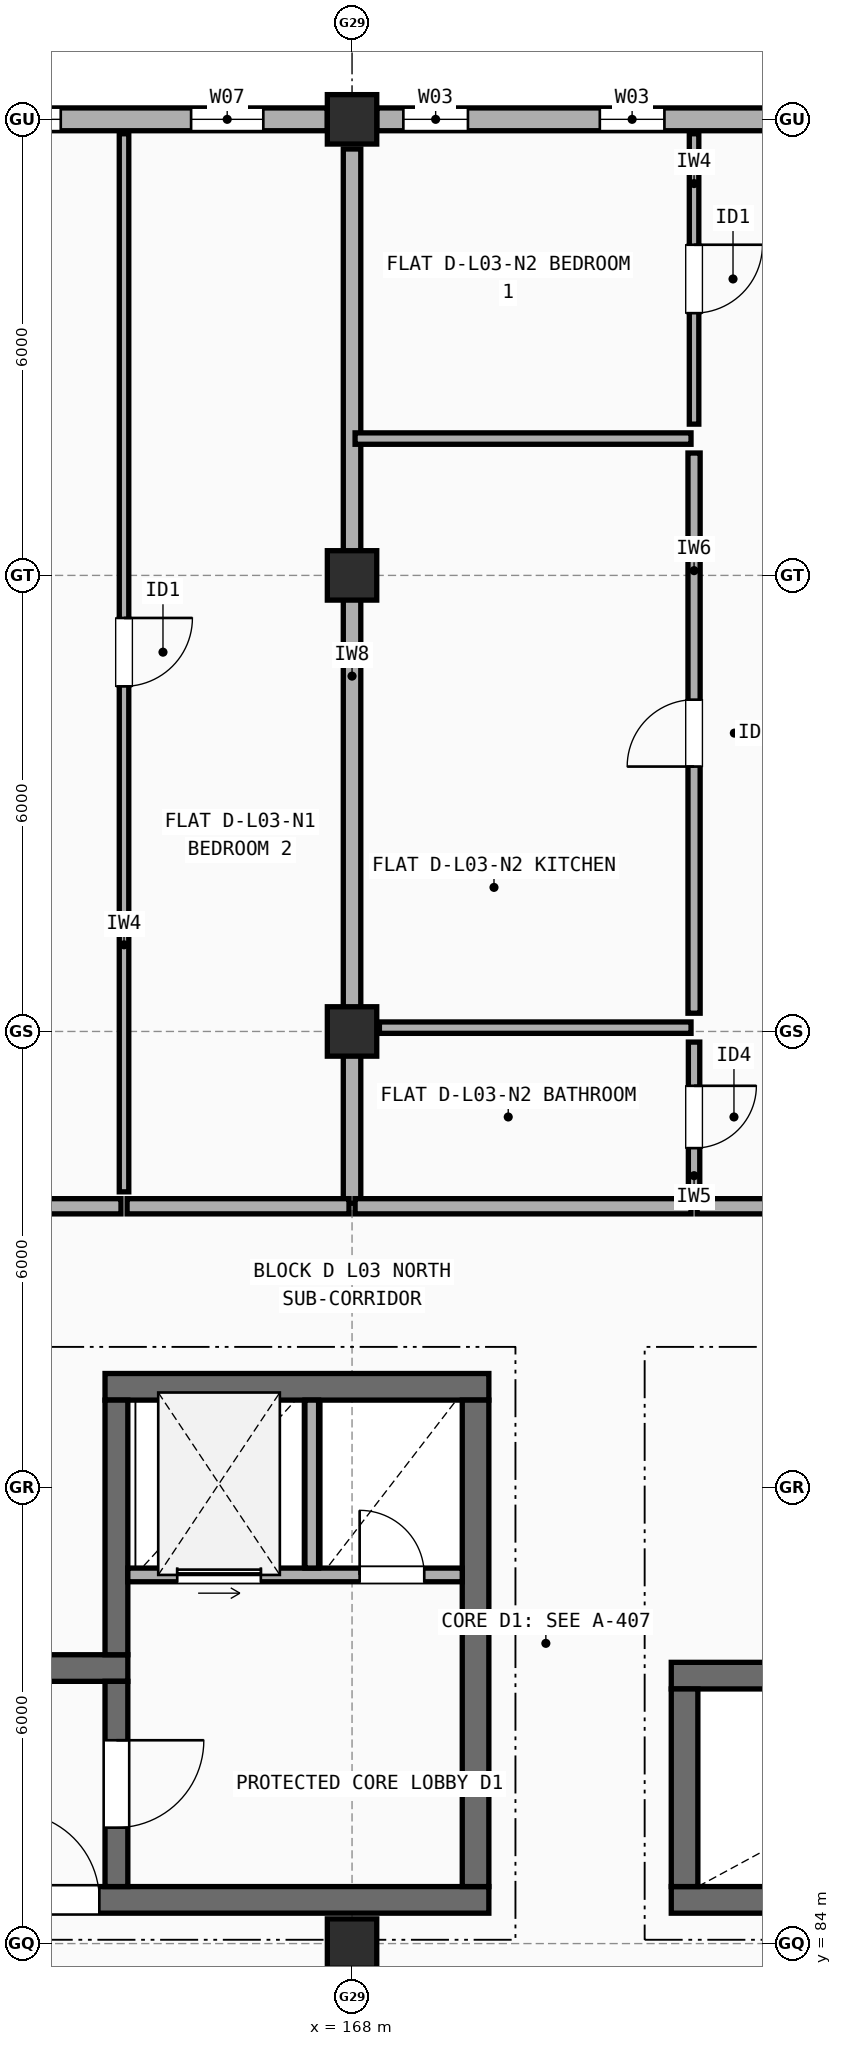
"""IFC4 building model, lengths in metres.
Left out: names, types, materials, properties, quantities, classifications, styles, units other than length and angle.
Written with IfcOpenShell. Run it as: python <this file> out.ifc"""

import sys

from ifc_helpers import new_model, si_unit, direction, frame, frame_2d, origin, origin_2d, place, context, subcontext, project, spatial, rectangle, extrude, element, fill, save


model = new_model("IFC4")
c1 = context("Model", 3, precision=1e-05, world=origin(), true_north=direction((0.0, 1.0)))
c2 = subcontext(c1, "Body", "Model", "MODEL_VIEW")
j1 = project(units=[si_unit("LENGTHUNIT", "METRE"), si_unit("PLANEANGLEUNIT", "RADIAN")], contexts=[c1])
p1 = place(None, origin())
s1 = spatial("IfcSite", under=j1, at=p1, CompositionType="ELEMENT")
p2 = place(p1, origin())
s2 = spatial("IfcBuilding", under=s1, at=p2, CompositionType="ELEMENT")
p3 = place(p2, frame((0.0, 0.0, 10.9)))
s3 = spatial("IfcBuildingStorey", under=s2, at=p3, CompositionType="ELEMENT", Elevation=10.9)
for number, where, z_axis, x_axis in (
    (1, (168.0, 84.0, 0.0), (0.0, 0.0, 1.0), (1.0, 0.0, 0.0)),
    (2, (168.0, 96.0, 0.0), (0.0, 0.0, 1.0), (1.0, 0.0, 0.0)),
    (3, (168.0, 102.0, 0.0), (0.0, 0.0, 1.0), (1.0, 0.0, 0.0)),
    (4, (168.0, 108.0, 0.0), (0.0, 0.0, 1.0), (1.0, 0.0, 0.0)),
):
    element("IfcColumn", number, at=place(p3, frame(where, z_axis=z_axis, x_axis=x_axis)), inside=s3, PredefinedType="COLUMN", context=c2, shape_type="SweptSolid", body=[
        extrude(rectangle(XDim=0.65, YDim=0.65, at=origin_2d()), origin(), (0.0, 0.0, 1.0), 2.96),
    ])
p4 = place(p3, frame((173.675, 108.0, 0.0), z_axis=(0.0, 0.0, 1.0), x_axis=(-1.0, 0.0, 0.0)))
e5 = element("IfcWall", 5, at=p4, inside=s3, PredefinedType="STANDARD", context=c2, shape_type="SweptSolid", body=[
    extrude(rectangle(XDim=5.35, YDim=0.3, at=frame_2d((2.675, 0.0))), origin(), (0.0, 0.0, 1.0), 2.442),
])
p5 = place(p4, frame((1.565, 0.0, 0.9)))
e6 = element("IfcOpeningElement", 6, at=p5, cuts=e5, PredefinedType="OPENING", context=c2, shape_type="SweptSolid", body=[
    extrude(rectangle(XDim=0.85, YDim=1.25, at=frame_2d((0.425, 0.625))), frame((0.0, 0.16, 0.0), z_axis=(0.0, -1.0, 0.0), x_axis=(1.0, 0.0, 0.0)), (0.0, 0.0, 1.0), 0.32),
])
p6 = place(p4, frame((4.15, 0.0, 0.9)))
e7 = element("IfcOpeningElement", 7, at=p6, cuts=e5, PredefinedType="OPENING", context=c2, shape_type="SweptSolid", body=[
    extrude(rectangle(XDim=0.85, YDim=1.25, at=frame_2d((0.425, 0.625))), frame((0.0, 0.16, 0.0), z_axis=(0.0, -1.0, 0.0), x_axis=(1.0, 0.0, 0.0)), (0.0, 0.0, 1.0), 0.32),
])
p7 = place(p3, frame((167.675, 108.0, 0.0), z_axis=(0.0, 0.0, 1.0), x_axis=(-1.0, 0.0, 0.0)))
e8 = element("IfcWall", 8, at=p7, inside=s3, PredefinedType="STANDARD", context=c2, shape_type="SweptSolid", body=[
    extrude(rectangle(XDim=5.35, YDim=0.3, at=frame_2d((2.675, 0.0))), origin(), (0.0, 0.0, 1.0), 2.442),
])
p8 = place(p7, frame((0.843, 0.0, 0.9)))
e9 = element("IfcOpeningElement", 9, at=p8, cuts=e8, PredefinedType="OPENING", context=c2, shape_type="SweptSolid", body=[
    extrude(rectangle(XDim=0.95, YDim=1.35, at=frame_2d((0.475, 0.675))), frame((0.0, 0.16, 0.0), z_axis=(0.0, -1.0, 0.0), x_axis=(1.0, 0.0, 0.0)), (0.0, 0.0, 1.0), 0.32),
])
p9 = place(p7, frame((3.508, 0.0, 0.9)))
e10 = element("IfcOpeningElement", 10, at=p9, cuts=e8, PredefinedType="OPENING", context=c2, shape_type="SweptSolid", body=[
    extrude(rectangle(XDim=1.05, YDim=1.35, at=frame_2d((0.525, 0.675))), frame((0.0, 0.16, 0.0), z_axis=(0.0, -1.0, 0.0), x_axis=(1.0, 0.0, 0.0)), (0.0, 0.0, 1.0), 0.32),
])
p10 = place(p3, frame((158.4, 84.575, 0.0), z_axis=(0.0, 0.0, 1.0), x_axis=(1.0, 0.0, 0.0)))
e11 = element("IfcWall", 11, at=p10, inside=s3, PredefinedType="SHEAR", context=c2, shape_type="SweptSolid", body=[
    extrude(rectangle(XDim=11.4, YDim=0.35, at=frame_2d((5.7, 0.0))), origin(), (0.0, 0.0, 1.0), 2.96),
])
p11 = place(p10, frame((5.125, 0.0, 0.0)))
e12 = element("IfcOpeningElement", 12, at=p11, cuts=e11, PredefinedType="OPENING", context=c2, shape_type="SweptSolid", body=[
    extrude(rectangle(XDim=1.15, YDim=2.15, at=frame_2d((0.575, 1.075))), frame((0.0, 0.185, 0.0), z_axis=(0.0, -1.0, 0.0), x_axis=(1.0, 0.0, 0.0)), (0.0, 0.0, 1.0), 0.37),
])
p12 = place(p3, frame((165.05, 87.625, 0.0), z_axis=(0.0, 0.0, 1.0), x_axis=(-1.0, 0.0, 0.0)))
e13 = element("IfcWall", 13, at=p12, inside=s3, PredefinedType="SHEAR", context=c2, shape_type="SweptSolid", body=[
    extrude(rectangle(XDim=6.65, YDim=0.35, at=frame_2d((3.325, 0.0))), origin(), (0.0, 0.0, 1.0), 2.96),
])
p13 = place(p3, frame((164.9, 84.75, 0.0), z_axis=(0.0, 0.0, 1.0), x_axis=(0.0, 1.0, 0.0)))
e14 = element("IfcWall", 14, at=p13, inside=s3, PredefinedType="SHEAR", context=c2, shape_type="SweptSolid", body=[
    extrude(rectangle(XDim=2.7, YDim=0.3, at=frame_2d((1.35, 0.0))), origin(), (0.0, 0.0, 1.0), 2.96),
])
p14 = place(p13, frame((0.775, 0.0, 0.0)))
e15 = element("IfcOpeningElement", 15, at=p14, cuts=e14, PredefinedType="OPENING", context=c2, shape_type="SweptSolid", body=[
    extrude(rectangle(XDim=1.15, YDim=2.15, at=frame_2d((0.575, 1.075))), frame((0.0, 0.16, 0.0), z_axis=(0.0, -1.0, 0.0), x_axis=(1.0, 0.0, 0.0)), (0.0, 0.0, 1.0), 0.32),
])
p15 = place(p3, frame((169.8, 91.325, 0.0), z_axis=(0.0, 0.0, 1.0), x_axis=(-1.0, 0.0, 0.0)))
e16 = element("IfcWall", 16, at=p15, inside=s3, PredefinedType="SHEAR", context=c2, shape_type="SweptSolid", body=[
    extrude(rectangle(XDim=5.05, YDim=0.35, at=frame_2d((2.525, 0.0))), origin(), (0.0, 0.0, 1.0), 2.96),
])
p16 = place(p3, frame((169.625, 84.75, 0.0), z_axis=(0.0, 0.0, 1.0), x_axis=(0.0, 1.0, 0.0)))
e17 = element("IfcWall", 17, at=p16, inside=s3, PredefinedType="SHEAR", context=c2, shape_type="SweptSolid", body=[
    extrude(rectangle(XDim=6.4, YDim=0.35, at=frame_2d((3.2, 0.0))), origin(), (0.0, 0.0, 1.0), 2.96),
])
p17 = place(p3, frame((164.9, 87.8, 0.0), z_axis=(0.0, 0.0, 1.0), x_axis=(0.0, 1.0, 0.0)))
e18 = element("IfcWall", 18, at=p17, inside=s3, PredefinedType="SHEAR", context=c2, shape_type="SweptSolid", body=[
    extrude(rectangle(XDim=3.35, YDim=0.3, at=frame_2d((1.675, 0.0))), origin(), (0.0, 0.0, 1.0), 2.96),
])
p18 = place(p3, frame((165.05, 88.85, 0.0), z_axis=(0.0, 0.0, 1.0), x_axis=(1.0, 0.0, 0.0)))
e19 = element("IfcWall", 19, at=p18, inside=s3, PredefinedType="SOLIDWALL", context=c2, shape_type="SweptSolid", body=[
    extrude(rectangle(XDim=4.4, YDim=0.18, at=frame_2d((2.2, 0.0))), origin(), (0.0, 0.0, 1.0), 2.96),
])
p19 = place(p18, frame((0.65, 0.0, 0.0)))
e20 = element("IfcOpeningElement", 20, at=p19, cuts=e19, PredefinedType="OPENING", context=c2, shape_type="SweptSolid", body=[
    extrude(rectangle(XDim=1.1, YDim=2.15, at=frame_2d((0.55, 1.075))), frame((0.0, 0.1, 0.0), z_axis=(0.0, -1.0, 0.0), x_axis=(1.0, 0.0, 0.0)), (0.0, 0.0, 1.0), 0.2),
])
p20 = place(p18, frame((3.05, 0.0, 0.0)))
e21 = element("IfcOpeningElement", 21, at=p20, cuts=e19, PredefinedType="OPENING", context=c2, shape_type="SweptSolid", body=[
    extrude(rectangle(XDim=0.85, YDim=2.1, at=frame_2d((0.425, 1.05))), frame((0.0, 0.1, 0.0), z_axis=(0.0, -1.0, 0.0), x_axis=(1.0, 0.0, 0.0)), (0.0, 0.0, 1.0), 0.2),
])
p21 = place(p3, frame((167.47, 88.94, 0.0), z_axis=(0.0, 0.0, 1.0), x_axis=(0.0, 1.0, 0.0)))
e22 = element("IfcWall", 22, at=p21, inside=s3, PredefinedType="SOLIDWALL", context=c2, shape_type="SweptSolid", body=[
    extrude(rectangle(XDim=2.21, YDim=0.18, at=frame_2d((1.105, 0.0))), origin(), (0.0, 0.0, 1.0), 2.96),
])
p22 = place(p3, frame((172.2, 84.575, 0.0), z_axis=(0.0, 0.0, 1.0), x_axis=(1.0, 0.0, 0.0)))
e23 = element("IfcWall", 23, at=p22, inside=s3, PredefinedType="SHEAR", context=c2, shape_type="SweptSolid", body=[
    extrude(rectangle(XDim=11.4, YDim=0.35, at=frame_2d((5.7, 0.0))), origin(), (0.0, 0.0, 1.0), 2.96),
])
p23 = place(p22, frame((5.1, 0.0, 0.0)))
e24 = element("IfcOpeningElement", 24, at=p23, cuts=e23, PredefinedType="OPENING", context=c2, shape_type="SweptSolid", body=[
    extrude(rectangle(XDim=1.2, YDim=2.15, at=frame_2d((0.6, 1.075))), frame((0.0, 0.185, 0.0), z_axis=(0.0, -1.0, 0.0), x_axis=(1.0, 0.0, 0.0)), (0.0, 0.0, 1.0), 0.37),
])
p24 = place(p3, frame((178.85, 87.525, 0.0), z_axis=(0.0, 0.0, 1.0), x_axis=(-1.0, 0.0, 0.0)))
e25 = element("IfcWall", 25, at=p24, inside=s3, PredefinedType="SHEAR", context=c2, shape_type="SweptSolid", body=[
    extrude(rectangle(XDim=6.65, YDim=0.35, at=frame_2d((3.325, 0.0))), origin(), (0.0, 0.0, 1.0), 2.96),
])
p25 = place(p3, frame((172.375, 87.35, 0.0), z_axis=(0.0, 0.0, 1.0), x_axis=(0.0, -1.0, 0.0)))
e26 = element("IfcWall", 26, at=p25, inside=s3, PredefinedType="SHEAR", context=c2, shape_type="SweptSolid", body=[
    extrude(rectangle(XDim=2.6, YDim=0.35, at=frame_2d((1.3, 0.0))), origin(), (0.0, 0.0, 1.0), 2.96),
])
p26 = place(p3, frame((168.0, 93.74, 0.0), z_axis=(0.0, 0.0, 1.0), x_axis=(0.0, 1.0, 0.0)))
e27 = element("IfcWall", 27, at=p26, inside=s3, PredefinedType="SOLIDWALL", context=c2, shape_type="SweptSolid", body=[
    extrude(rectangle(XDim=13.87, YDim=0.23, at=frame_2d((6.935, 0.0))), origin(), (0.0, 0.0, 1.0), 2.458),
])
p27 = place(p3, frame((154.54, 93.7, 0.0), z_axis=(0.0, 0.0, 1.0), x_axis=(1.0, 0.0, 0.0)))
e28 = element("IfcWall", 28, at=p27, inside=s3, PredefinedType="SOLIDWALL", context=c2, shape_type="SweptSolid", body=[
    extrude(rectangle(XDim=10.42, YDim=0.2, at=frame_2d((5.21, 0.0))), origin(), (0.0, 0.0, 1.0), 2.442),
])
p28 = place(p27, frame((4.72, 0.0, 0.0)))
e29 = element("IfcOpeningElement", 29, at=p28, cuts=e28, PredefinedType="OPENING", context=c2, shape_type="SweptSolid", body=[
    extrude(rectangle(XDim=0.98, YDim=2.15, at=frame_2d((0.49, 1.075))), frame((0.0, 0.11, 0.0), z_axis=(0.0, -1.0, 0.0), x_axis=(1.0, 0.0, 0.0)), (0.0, 0.0, 1.0), 0.22),
])
p29 = place(p3, frame((165.04, 93.7, 0.0), z_axis=(0.0, 0.0, 1.0), x_axis=(1.0, 0.0, 0.0)))
e30 = element("IfcWall", 30, at=p29, inside=s3, PredefinedType="SOLIDWALL", context=c2, shape_type="SweptSolid", body=[
    extrude(rectangle(XDim=2.92, YDim=0.2, at=frame_2d((1.46, 0.0))), origin(), (0.0, 0.0, 1.0), 2.508),
])
p30 = place(p3, frame((165.0, 93.89, 0.0), z_axis=(0.0, 0.0, 1.0), x_axis=(0.0, 1.0, 0.0)))
e31 = element("IfcWall", 31, at=p30, inside=s3, PredefinedType="PARTITIONING", context=c2, shape_type="SweptSolid", body=[
    extrude(rectangle(XDim=13.92, YDim=0.125, at=frame_2d((6.96, 0.0))), origin(), (0.0, 0.0, 1.0), 2.408),
])
p31 = place(p30, frame((6.65, 0.0, 0.0)))
e32 = element("IfcOpeningElement", 32, at=p31, cuts=e31, PredefinedType="OPENING", context=c2, shape_type="SweptSolid", body=[
    extrude(rectangle(XDim=0.9, YDim=2.1, at=frame_2d((0.45, 1.05))), frame((0.0, 0.073, 0.0), z_axis=(0.0, -1.0, 0.0), x_axis=(1.0, 0.0, 0.0)), (0.0, 0.0, 1.0), 0.145),
])
p32 = place(p3, frame((168.04, 93.7, 0.0), z_axis=(0.0, 0.0, 1.0), x_axis=(1.0, 0.0, 0.0)))
e33 = element("IfcWall", 33, at=p32, inside=s3, PredefinedType="SOLIDWALL", context=c2, shape_type="SweptSolid", body=[
    extrude(rectangle(XDim=4.42, YDim=0.2, at=frame_2d((2.21, 0.0))), origin(), (0.0, 0.0, 1.0), 2.508),
])
p33 = place(p3, frame((172.54, 93.7, 0.0), z_axis=(0.0, 0.0, 1.0), x_axis=(1.0, 0.0, 0.0)))
e34 = element("IfcWall", 34, at=p33, inside=s3, PredefinedType="SOLIDWALL", context=c2, shape_type="SweptSolid", body=[
    extrude(rectangle(XDim=10.42, YDim=0.2, at=frame_2d((5.21, 0.0))), origin(), (0.0, 0.0, 1.0), 2.96),
])
p34 = place(p33, frame((4.71, 0.0, 0.0)))
e35 = element("IfcOpeningElement", 35, at=p34, cuts=e34, PredefinedType="OPENING", context=c2, shape_type="SweptSolid", body=[
    extrude(rectangle(XDim=1.0, YDim=2.15, at=frame_2d((0.5, 1.075))), frame((0.0, 0.11, 0.0), z_axis=(0.0, -1.0, 0.0), x_axis=(1.0, 0.0, 0.0)), (0.0, 0.0, 1.0), 0.22),
])
p35 = place(p3, frame((172.5, 103.99, 0.0), z_axis=(0.0, 0.0, 1.0), x_axis=(0.0, 1.0, 0.0)))
e36 = element("IfcWall", 36, at=p35, inside=s3, PredefinedType="PARTITIONING", context=c2, shape_type="SweptSolid", body=[
    extrude(rectangle(XDim=3.82, YDim=0.125, at=frame_2d((1.91, 0.0))), origin(), (0.0, 0.0, 1.0), 2.96),
])
p36 = place(p35, frame((1.46, 0.0, 0.0)))
e37 = element("IfcOpeningElement", 37, at=p36, cuts=e36, PredefinedType="OPENING", context=c2, shape_type="SweptSolid", body=[
    extrude(rectangle(XDim=0.9, YDim=2.1, at=frame_2d((0.45, 1.05))), frame((0.0, 0.073, 0.0), z_axis=(0.0, -1.0, 0.0), x_axis=(1.0, 0.0, 0.0)), (0.0, 0.0, 1.0), 0.145),
])
p37 = place(p3, frame((172.5, 96.24, 0.0), z_axis=(0.0, 0.0, 1.0), x_axis=(0.0, 1.0, 0.0)))
e38 = element("IfcWall", 38, at=p37, inside=s3, PredefinedType="PLUMBINGWALL", context=c2, shape_type="SweptSolid", body=[
    extrude(rectangle(XDim=7.37, YDim=0.16, at=frame_2d((3.685, 0.0))), origin(), (0.0, 0.0, 1.0), 2.442),
])
p38 = place(p37, frame((3.245, 0.0, 0.0)))
e39 = element("IfcOpeningElement", 39, at=p38, cuts=e38, PredefinedType="OPENING", context=c2, shape_type="SweptSolid", body=[
    extrude(rectangle(XDim=0.88, YDim=2.1, at=frame_2d((0.44, 1.05))), frame((0.0, 0.09, 0.0), z_axis=(0.0, -1.0, 0.0), x_axis=(1.0, 0.0, 0.0)), (0.0, 0.0, 1.0), 0.18),
])
p39 = place(p3, frame((172.5, 93.89, 0.0), z_axis=(0.0, 0.0, 1.0), x_axis=(0.0, 1.0, 0.0)))
e40 = element("IfcWall", 40, at=p39, inside=s3, PredefinedType="PARTITIONING", context=c2, shape_type="SweptSolid", body=[
    extrude(rectangle(XDim=1.97, YDim=0.15, at=frame_2d((0.985, 0.0))), origin(), (0.0, 0.0, 1.0), 2.96),
])
p40 = place(p39, frame((0.575, 0.0, 0.0)))
e41 = element("IfcOpeningElement", 41, at=p40, cuts=e40, PredefinedType="OPENING", context=c2, shape_type="SweptSolid", body=[
    extrude(rectangle(XDim=0.82, YDim=2.08, at=frame_2d((0.41, 1.04))), frame((0.0, 0.085, 0.0), z_axis=(0.0, -1.0, 0.0), x_axis=(1.0, 0.0, 0.0)), (0.0, 0.0, 1.0), 0.17),
])
p41 = place(p3, frame((168.04, 103.8, 0.0), z_axis=(0.0, 0.0, 1.0), x_axis=(1.0, 0.0, 0.0)))
e42 = element("IfcWall", 42, at=p41, inside=s3, PredefinedType="PARTITIONING", context=c2, shape_type="SweptSolid", body=[
    extrude(rectangle(XDim=4.42, YDim=0.15, at=frame_2d((2.21, 0.0))), origin(), (0.0, 0.0, 1.0), 2.458),
])
p42 = place(p3, frame((168.36, 96.05, 0.0), z_axis=(0.0, 0.0, 1.0), x_axis=(1.0, 0.0, 0.0)))
e43 = element("IfcWall", 43, at=p42, inside=s3, PredefinedType="PARTITIONING", context=c2, shape_type="SweptSolid", body=[
    extrude(rectangle(XDim=4.1, YDim=0.15, at=frame_2d((2.05, 0.0))), origin(), (0.0, 0.0, 1.0), 2.548),
])
p43 = place(p5, origin())
e44 = element("IfcWindow", 44, at=p43, inside=s3, PartitioningType="SINGLE_PANEL", PredefinedType="WINDOW", context=c2, shape_type="SweptSolid", body=[
    extrude(rectangle(XDim=0.85, YDim=1.25, at=frame_2d((0.425, 0.625))), frame((0.0, 0.03, 0.0), z_axis=(0.0, -1.0, 0.0), x_axis=(1.0, 0.0, 0.0)), (0.0, 0.0, 1.0), 0.06),
])
fill(e6, e44)
p44 = place(p6, origin())
e45 = element("IfcWindow", 45, at=p44, inside=s3, PartitioningType="SINGLE_PANEL", PredefinedType="WINDOW", context=c2, shape_type="SweptSolid", body=[
    extrude(rectangle(XDim=0.85, YDim=1.25, at=frame_2d((0.425, 0.625))), frame((0.0, 0.03, 0.0), z_axis=(0.0, -1.0, 0.0), x_axis=(1.0, 0.0, 0.0)), (0.0, 0.0, 1.0), 0.06),
])
fill(e7, e45)
p45 = place(p8, origin())
e46 = element("IfcWindow", 46, at=p45, inside=s3, PartitioningType="SINGLE_PANEL", PredefinedType="WINDOW", context=c2, shape_type="SweptSolid", body=[
    extrude(rectangle(XDim=0.95, YDim=1.35, at=frame_2d((0.475, 0.675))), frame((0.0, 0.03, 0.0), z_axis=(0.0, -1.0, 0.0), x_axis=(1.0, 0.0, 0.0)), (0.0, 0.0, 1.0), 0.06),
])
fill(e9, e46)
p46 = place(p9, origin())
e47 = element("IfcWindow", 47, at=p46, inside=s3, PartitioningType="SINGLE_PANEL", PredefinedType="WINDOW", context=c2, shape_type="SweptSolid", body=[
    extrude(rectangle(XDim=1.05, YDim=1.35, at=frame_2d((0.525, 0.675))), frame((0.0, 0.03, 0.0), z_axis=(0.0, -1.0, 0.0), x_axis=(1.0, 0.0, 0.0)), (0.0, 0.0, 1.0), 0.06),
])
fill(e10, e47)
p47 = place(p11, origin())
e48 = element("IfcDoor", 48, at=p47, inside=s3, OperationType="SINGLE_SWING_LEFT", PredefinedType="DOOR", context=c2, shape_type="SweptSolid", body=[
    extrude(rectangle(XDim=1.15, YDim=2.15, at=frame_2d((0.575, 1.075))), frame((0.0, 0.025, 0.0), z_axis=(0.0, -1.0, 0.0), x_axis=(1.0, 0.0, 0.0)), (0.0, 0.0, 1.0), 0.05),
])
fill(e12, e48)
p48 = place(p14, origin())
e49 = element("IfcDoor", 49, at=p48, inside=s3, OperationType="SINGLE_SWING_RIGHT", PredefinedType="DOOR", context=c2, shape_type="SweptSolid", body=[
    extrude(rectangle(XDim=1.15, YDim=2.15, at=frame_2d((0.575, 1.075))), frame((0.0, 0.025, 0.0), z_axis=(0.0, -1.0, 0.0), x_axis=(1.0, 0.0, 0.0)), (0.0, 0.0, 1.0), 0.05),
])
fill(e15, e49)
p49 = place(p19, origin())
e50 = element("IfcDoor", 50, at=p49, inside=s3, OperationType="SLIDING_TO_LEFT", PredefinedType="DOOR", context=c2, shape_type="SweptSolid", body=[
    extrude(rectangle(XDim=1.1, YDim=2.15, at=frame_2d((0.55, 1.075))), frame((0.0, 0.025, 0.0), z_axis=(0.0, -1.0, 0.0), x_axis=(1.0, 0.0, 0.0)), (0.0, 0.0, 1.0), 0.05),
])
fill(e20, e50)
p50 = place(p20, frame((0.85, 0.0, 0.0), z_axis=(0.0, 0.0, 1.0), x_axis=(-1.0, 0.0, 0.0)))
e51 = element("IfcDoor", 51, at=p50, inside=s3, OperationType="SINGLE_SWING_LEFT", PredefinedType="DOOR", context=c2, shape_type="SweptSolid", body=[
    extrude(rectangle(XDim=0.85, YDim=2.1, at=frame_2d((0.425, 1.05))), frame((0.0, 0.025, 0.0), z_axis=(0.0, -1.0, 0.0), x_axis=(1.0, 0.0, 0.0)), (0.0, 0.0, 1.0), 0.05),
])
fill(e21, e51)
p51 = place(p31, origin())
e52 = element("IfcDoor", 52, at=p51, inside=s3, OperationType="SINGLE_SWING_RIGHT", PredefinedType="DOOR", context=c2, shape_type="SweptSolid", body=[
    extrude(rectangle(XDim=0.9, YDim=2.1, at=frame_2d((0.45, 1.05))), frame((0.0, 0.025, 0.0), z_axis=(0.0, -1.0, 0.0), x_axis=(1.0, 0.0, 0.0)), (0.0, 0.0, 1.0), 0.05),
])
fill(e32, e52)
p52 = place(p36, origin())
e53 = element("IfcDoor", 53, at=p52, inside=s3, OperationType="SINGLE_SWING_RIGHT", PredefinedType="DOOR", context=c2, shape_type="SweptSolid", body=[
    extrude(rectangle(XDim=0.9, YDim=2.1, at=frame_2d((0.45, 1.05))), frame((0.0, 0.025, 0.0), z_axis=(0.0, -1.0, 0.0), x_axis=(1.0, 0.0, 0.0)), (0.0, 0.0, 1.0), 0.05),
])
fill(e37, e53)
p53 = place(p38, origin())
e54 = element("IfcDoor", 54, at=p53, inside=s3, OperationType="SINGLE_SWING_LEFT", PredefinedType="DOOR", context=c2, shape_type="SweptSolid", body=[
    extrude(rectangle(XDim=0.88, YDim=2.1, at=frame_2d((0.44, 1.05))), frame((0.0, 0.025, 0.0), z_axis=(0.0, -1.0, 0.0), x_axis=(1.0, 0.0, 0.0)), (0.0, 0.0, 1.0), 0.05),
])
fill(e39, e54)
p54 = place(p40, origin())
e55 = element("IfcDoor", 55, at=p54, inside=s3, OperationType="SINGLE_SWING_RIGHT", PredefinedType="DOOR", context=c2, shape_type="SweptSolid", body=[
    extrude(rectangle(XDim=0.82, YDim=2.08, at=frame_2d((0.41, 1.04))), frame((0.0, 0.025, 0.0), z_axis=(0.0, -1.0, 0.0), x_axis=(1.0, 0.0, 0.0)), (0.0, 0.0, 1.0), 0.05),
])
fill(e41, e55)
save(model, sys.argv[1])
